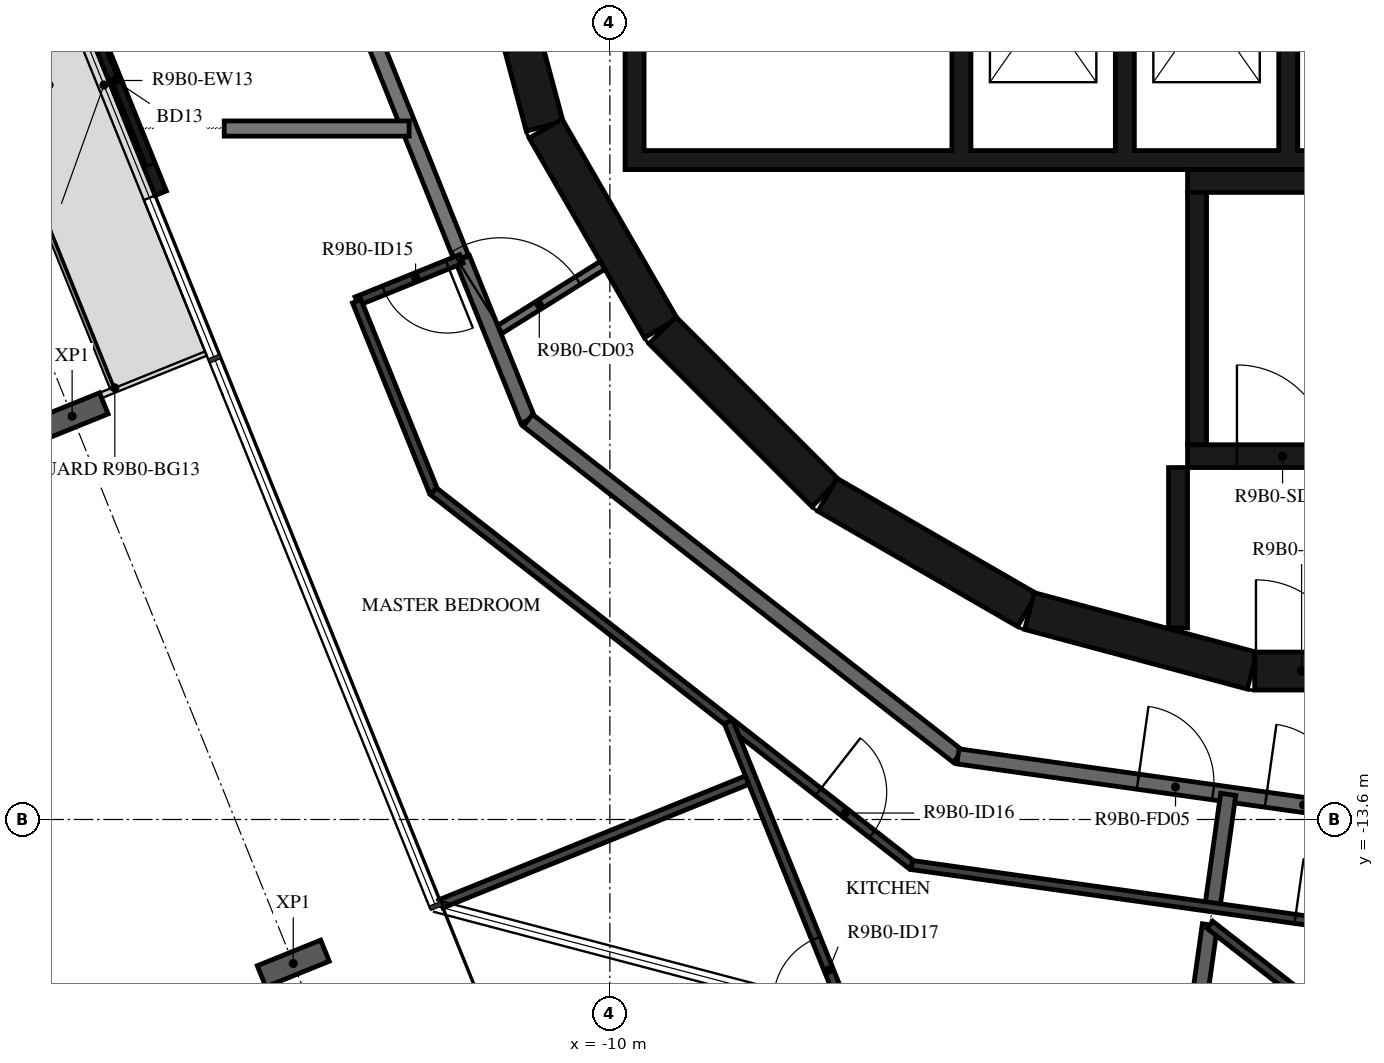
"""IFC4 building model, lengths in metres.
Left out: names, types, materials, properties, quantities, classifications, styles, units other than length and angle.
Written with IfcOpenShell. Run it as: python <this file> out.ifc"""

import sys

from ifc_helpers import new_model, si_unit, direction, frame, frame_2d, origin, origin_2d, place, context, subcontext, project, spatial, polyline, rectangle, i_section, outline, extrude, element, fill, save


model = new_model("IFC4")
c1 = context("Model", 3, precision=1e-05, world=origin(), true_north=direction((0.0, 1.0)))
c2 = subcontext(c1, "Body", "Model", "MODEL_VIEW")
j1 = project(units=[si_unit("LENGTHUNIT", "METRE"), si_unit("PLANEANGLEUNIT", "RADIAN")], contexts=[c1])
p1 = place(None, origin())
s1 = spatial("IfcSite", under=j1, at=p1, CompositionType="ELEMENT")
p2 = place(p1, origin())
s2 = spatial("IfcBuilding", under=s1, at=p2, CompositionType="ELEMENT")
p3 = place(p2, frame((0.0, 0.0, 347.0)))
s3 = spatial("IfcBuildingStorey", under=s2, at=p3, CompositionType="ELEMENT", Elevation=347.0)
for number, where, z_axis, x_axis in (
    (1, (-17.075, -8.294, -0.38), (0.0, 0.0, 1.0), (-0.375, 0.927, 0.0)),
    (2, (-14.166, -15.495, -0.38), (0.0, 0.0, 1.0), (-0.375, 0.927, 0.0)),
):
    element("IfcColumn", number, at=place(p3, frame(where, z_axis=z_axis, x_axis=x_axis)), inside=s3, PredefinedType="COLUMN", context=c2, shape_type="SweptSolid", body=[
        extrude(i_section(OverallWidth=0.3, OverallDepth=0.9, WebThickness=0.019, FlangeThickness=0.035, FilletRadius=0.03, at=origin_2d()), origin(), (0.0, 0.0, 1.0), 3.5),
    ])
p4 = place(p3, frame((-17.107, -2.394, 0.0), z_axis=(0.0, 0.0, 1.0), x_axis=(0.374598019739, -0.927187318511, 0.0)))
e3 = element("IfcWall", 3, at=p4, inside=s3, PredefinedType="STANDARD", context=c2, shape_type="SweptSolid", body=[
    extrude(rectangle(XDim=3.2, YDim=0.16, at=frame_2d((1.6, 0.0))), origin(), (0.0, 0.0, 1.0), 3.12),
])
p5 = place(p4, frame((0.4, 0.0, 0.0)))
e4 = element("IfcOpeningElement", 4, at=p5, cuts=e3, PredefinedType="OPENING", context=c2, shape_type="SweptSolid", body=[
    extrude(rectangle(XDim=2.4, YDim=2.4, at=frame_2d((1.2, 1.2))), frame((0.0, 0.09, 0.0), z_axis=(0.0, -1.0, 0.0), x_axis=(1.0, 0.0, 0.0)), (0.0, 0.0, 1.0), 0.18),
])
p6 = place(p3, frame((-11.643, -1.55, 0.0), z_axis=(0.0, 0.0, 1.0), x_axis=(0.258734743916, -0.965948410781, 0.0)))
e5 = element("IfcWall", 5, at=p6, inside=s3, PredefinedType="SHEAR", context=c2, shape_type="SweptSolid", body=[
    extrude(rectangle(XDim=3.033, YDim=0.5, at=frame_2d((1.516, 0.0))), origin(), (0.0, 0.0, 1.0), 3.12),
])
p7 = place(p6, frame((1.066, 0.0, 0.0)))
e6 = element("IfcOpeningElement", 6, at=p7, cuts=e5, PredefinedType="OPENING", context=c2, shape_type="SweptSolid", body=[
    extrude(rectangle(XDim=0.9, YDim=2.1, at=frame_2d((0.45, 1.05))), frame((0.0, 0.26, 0.0), z_axis=(0.0, -1.0, 0.0), x_axis=(1.0, 0.0, 0.0)), (0.0, 0.0, 1.0), 0.52),
])
p8 = place(p3, frame((-10.845, -4.51, 0.0), z_axis=(0.0, 0.0, 1.0), x_axis=(0.500087131594, -0.865975092491, 0.0)))
e7 = element("IfcWall", 7, at=p8, inside=s3, PredefinedType="SHEAR", context=c2, shape_type="SweptSolid", body=[
    extrude(rectangle(XDim=3.033, YDim=0.5, at=frame_2d((1.516, 0.0))), origin(), (0.0, 0.0, 1.0), 3.12),
])
p9 = place(p3, frame((-9.308, -7.164, 0.0), z_axis=(0.0, 0.0, 1.0), x_axis=(0.707106781187, -0.707106781187, 0.0)))
e8 = element("IfcWall", 8, at=p9, inside=s3, PredefinedType="SHEAR", context=c2, shape_type="SweptSolid", body=[
    extrude(rectangle(XDim=3.032, YDim=0.5, at=frame_2d((1.516, 0.0))), origin(), (0.0, 0.0, 1.0), 3.12),
])
for number, where, z_axis, x_axis in (
    (9, (-7.137, -9.329, 0.0), (0.0, 0.0, 1.0), (0.866, -0.5, 0.0)),
    (10, (-4.479, -10.858, 0.0), (0.0, 0.0, 1.0), (0.966, -0.259, 0.0)),
):
    element("IfcWall", number, at=place(p3, frame(where, z_axis=z_axis, x_axis=x_axis)), inside=s3, PredefinedType="SHEAR", context=c2, shape_type="SweptSolid", body=[
        extrude(rectangle(XDim=3.033, YDim=0.5, at=frame_2d((1.516, 0.0))), origin(), (0.0, 0.0, 1.0), 3.12),
    ])
p10 = place(p3, frame((-1.516, -11.647, 0.0), z_axis=(0.0, 0.0, 1.0), x_axis=(1.0, 0.0, 0.0)))
e11 = element("IfcWall", 11, at=p10, inside=s3, PredefinedType="SHEAR", context=c2, shape_type="SweptSolid", body=[
    extrude(rectangle(XDim=3.033, YDim=0.5, at=frame_2d((1.516, 0.0))), origin(), (0.0, 0.0, 1.0), 3.12),
])
p11 = place(p10, frame((0.016, 0.0, 0.0)))
e12 = element("IfcOpeningElement", 12, at=p11, cuts=e11, PredefinedType="OPENING", context=c2, shape_type="SweptSolid", body=[
    extrude(rectangle(XDim=1.2, YDim=2.1, at=frame_2d((0.6, 1.05))), frame((0.0, 0.26, 0.0), z_axis=(0.0, -1.0, 0.0), x_axis=(1.0, 0.0, 0.0)), (0.0, 0.0, 1.0), 0.52),
])
p12 = place(p3, frame((-2.275, -8.67, 0.0), z_axis=(0.0, 0.0, 1.0), x_axis=(0.0, 1.0, 0.0)))
e13 = element("IfcWall", 13, at=p12, inside=s3, PredefinedType="SHEAR", context=c2, shape_type="SweptSolid", body=[
    extrude(rectangle(XDim=3.32, YDim=0.25, at=frame_2d((1.66, 0.0))), origin(), (0.0, 0.0, 1.0), 3.12),
])
p13 = place(p3, frame((-2.4, -5.2, 0.0), z_axis=(0.0, 0.0, 1.0), x_axis=(1.0, 0.0, 0.0)))
e14 = element("IfcWall", 14, at=p13, inside=s3, PredefinedType="SHEAR", context=c2, shape_type="SweptSolid", body=[
    extrude(rectangle(XDim=7.05, YDim=0.3, at=frame_2d((3.525, 0.0))), origin(), (0.0, 0.0, 1.0), 3.12),
])
p14 = place(p3, frame((-2.4, -8.82, 0.0), z_axis=(0.0, 0.0, 1.0), x_axis=(1.0, 0.0, 0.0)))
e15 = element("IfcWall", 15, at=p14, inside=s3, PredefinedType="SHEAR", context=c2, shape_type="SweptSolid", body=[
    extrude(rectangle(XDim=2.5, YDim=0.3, at=frame_2d((1.25, 0.0))), origin(), (0.0, 0.0, 1.0), 3.12),
])
p15 = place(p14, frame((0.65, 0.0, 0.0)))
e16 = element("IfcOpeningElement", 16, at=p15, cuts=e15, PredefinedType="OPENING", context=c2, shape_type="SweptSolid", body=[
    extrude(rectangle(XDim=1.2, YDim=2.1, at=frame_2d((0.6, 1.05))), frame((0.0, 0.16, 0.0), z_axis=(0.0, -1.0, 0.0), x_axis=(1.0, 0.0, 0.0)), (0.0, 0.0, 1.0), 0.32),
])
p16 = place(p3, frame((-2.525, -8.97, 0.0), z_axis=(0.0, 0.0, 1.0), x_axis=(0.0, -1.0, 0.0)))
e17 = element("IfcWall", 17, at=p16, inside=s3, PredefinedType="SHEAR", context=c2, shape_type="SweptSolid", body=[
    extrude(rectangle(XDim=2.11, YDim=0.25, at=frame_2d((1.055, 0.0))), origin(), (0.0, 0.0, 1.0), 3.12),
])
p17 = place(p3, origin())
e18 = element("IfcWall", 18, at=p17, inside=s3, PredefinedType="SHEAR", context=c2, shape_type="SweptSolid", body=[
    extrude(outline(polyline([(9.8, -5.05), (9.8, -4.8), (9.8, -1.9), (9.55, -1.9), (9.55, -4.8), (7.65, -4.8), (7.65, -1.9), (7.4, -1.9), (7.4, -4.8), (5.5, -4.8), (5.5, -1.9), (5.25, -1.9), (5.25, -4.8), (3.35, -4.8), (3.35, -1.9), (3.1, -1.9), (3.1, -4.8), (1.2, -4.8), (1.2, -1.9), (0.95, -1.9), (0.95, -4.8), (-0.95, -4.8), (-0.95, -1.9), (-1.2, -1.9), (-1.2, -4.8), (-3.1, -4.8), (-3.1, -1.9), (-3.35, -1.9), (-3.35, -4.8), (-5.25, -4.8), (-5.25, -1.9), (-5.5, -1.9), (-5.5, -4.8), (-9.55, -4.8), (-9.55, -1.9), (-9.8, -1.9), (-9.8, -4.8), (-9.8, -5.05), (9.8, -5.05)])), origin(), (0.0, 0.0, 1.0), 3.12),
])
p18 = place(p3, frame((-11.539, -7.21, 0.0), z_axis=(0.0, 0.0, 1.0), x_axis=(0.848103039868, 0.529831325769, 0.0)))
e19 = element("IfcWall", 19, at=p18, inside=s3, PredefinedType="PARTITIONING", context=c2, shape_type="SweptSolid", body=[
    extrude(rectangle(XDim=1.702, YDim=0.12, at=frame_2d((0.851, 0.0))), origin(), (0.0, 0.0, 1.0), 3.12),
])
p19 = place(p18, frame((0.12, 0.0, 0.0)))
e20 = element("IfcOpeningElement", 20, at=p19, cuts=e19, PredefinedType="OPENING", context=c2, shape_type="SweptSolid", body=[
    extrude(rectangle(XDim=1.2, YDim=2.1, at=frame_2d((0.6, 1.05))), frame((0.0, 0.07, 0.0), z_axis=(0.0, -1.0, 0.0), x_axis=(1.0, 0.0, 0.0)), (0.0, 0.0, 1.0), 0.14),
])
p20 = place(p3, frame((-13.769, -1.691, 0.0), z_axis=(0.0, 0.0, 1.0), x_axis=(0.372720094028, -0.927943819155, 0.0)))
e21 = element("IfcWall", 21, at=p20, inside=s3, PredefinedType="STANDARD", context=c2, shape_type="SweptSolid", body=[
    extrude(rectangle(XDim=4.875, YDim=0.2, at=frame_2d((2.438, 0.0))), origin(), (0.0, 0.0, 1.0), 3.12),
])
p21 = place(p3, frame((-11.939, -6.22, 0.0), z_axis=(0.0, 0.0, 1.0), x_axis=(0.374651128394, -0.927165860024, 0.0)))
e22 = element("IfcWall", 22, at=p21, inside=s3, PredefinedType="STANDARD", context=c2, shape_type="SweptSolid", body=[
    extrude(rectangle(XDim=2.296, YDim=0.2, at=frame_2d((1.148, 0.0))), origin(), (0.0, 0.0, 1.0), 3.12),
])
p22 = place(p3, frame((-11.079, -8.349, 0.0), z_axis=(0.0, 0.0, 1.0), x_axis=(0.78800478687, -0.615669112324, 0.0)))
e23 = element("IfcWall", 23, at=p22, inside=s3, PredefinedType="STANDARD", context=c2, shape_type="SweptSolid", body=[
    extrude(rectangle(XDim=7.181, YDim=0.2, at=frame_2d((3.591, 0.0))), origin(), (0.0, 0.0, 1.0), 3.12),
])
p23 = place(p3, frame((-5.42, -12.77, 0.0), z_axis=(0.0, 0.0, 1.0), x_axis=(0.990270565508, -0.139155334385, 0.0)))
e24 = element("IfcWall", 24, at=p23, inside=s3, PredefinedType="STANDARD", context=c2, shape_type="SweptSolid", body=[
    extrude(rectangle(XDim=7.181, YDim=0.2, at=frame_2d((3.59, 0.0))), origin(), (0.0, 0.0, 1.0), 3.12),
])
p24 = place(p23, frame((2.39, 0.0, 0.0)))
e25 = element("IfcOpeningElement", 25, at=p24, cuts=e24, PredefinedType="OPENING", context=c2, shape_type="SweptSolid", body=[
    extrude(rectangle(XDim=1.0, YDim=2.1, at=frame_2d((0.5, 1.05))), frame((0.0, 0.11, 0.0), z_axis=(0.0, -1.0, 0.0), x_axis=(1.0, 0.0, 0.0)), (0.0, 0.0, 1.0), 0.22),
])
p25 = place(p23, frame((4.091, 0.0, 0.0)))
e26 = element("IfcOpeningElement", 26, at=p25, cuts=e24, PredefinedType="OPENING", context=c2, shape_type="SweptSolid", body=[
    extrude(rectangle(XDim=1.0, YDim=2.1, at=frame_2d((0.5, 1.05))), frame((0.0, 0.11, 0.0), z_axis=(0.0, -1.0, 0.0), x_axis=(1.0, 0.0, 0.0)), (0.0, 0.0, 1.0), 0.22),
])
p26 = place(p3, frame((-15.074, -4.51, 0.0), z_axis=(0.0, 0.0, 1.0), x_axis=(1.0, 0.0, 0.0)))
e27 = element("IfcWall", 27, at=p26, inside=s3, PredefinedType="STANDARD", context=c2, shape_type="SweptSolid", body=[
    extrude(rectangle(XDim=2.433, YDim=0.2, at=frame_2d((1.216, 0.0))), origin(), (0.0, 0.0, 1.0), 3.12),
])
p27 = place(p3, frame((-2.073, -14.755, 0.0), z_axis=(0.0, 0.0, 1.0), x_axis=(0.139005431033, 0.990291618738, 0.0)))
e28 = element("IfcWall", 28, at=p27, inside=s3, PredefinedType="STANDARD", context=c2, shape_type="SweptSolid", body=[
    extrude(rectangle(XDim=1.5, YDim=0.2, at=frame_2d((0.75, 0.0))), origin(), (0.0, 0.0, 1.0), 3.12),
])
p28 = place(p3, frame((-2.256, -16.055, 0.0), z_axis=(0.0, 0.0, 1.0), x_axis=(0.139109268657, 0.990277037689, 0.0)))
e29 = element("IfcWall", 29, at=p28, inside=s3, PredefinedType="STANDARD", context=c2, shape_type="SweptSolid", body=[
    extrude(rectangle(XDim=1.079, YDim=0.2, at=frame_2d((0.54, 0.0))), origin(), (0.0, 0.0, 1.0), 3.12),
])
p29 = place(p3, frame((-11.953, -6.225, 0.0), z_axis=(0.0, 0.0, 1.0), x_axis=(-0.927144096717, -0.374704982518, 0.0)))
e30 = element("IfcWall", 30, at=p29, inside=s3, PredefinedType="PARTITIONING", context=c2, shape_type="SweptSolid", body=[
    extrude(rectangle(XDim=1.485, YDim=0.12, at=frame_2d((0.742, 0.0))), origin(), (0.0, 0.0, 1.0), 3.12),
])
p30 = place(p29, frame((0.2, 0.0, 0.0)))
e31 = element("IfcOpeningElement", 31, at=p30, cuts=e30, PredefinedType="OPENING", context=c2, shape_type="SweptSolid", body=[
    extrude(rectangle(XDim=0.9, YDim=2.1, at=frame_2d((0.45, 1.05))), frame((0.0, 0.07, 0.0), z_axis=(0.0, -1.0, 0.0), x_axis=(1.0, 0.0, 0.0)), (0.0, 0.0, 1.0), 0.14),
])
p31 = place(p3, frame((-13.33, -6.782, 0.0), z_axis=(0.0, 0.0, 1.0), x_axis=(0.374602180132, -0.927185637637, 0.0)))
e32 = element("IfcWall", 32, at=p31, inside=s3, PredefinedType="PARTITIONING", context=c2, shape_type="SweptSolid", body=[
    extrude(rectangle(XDim=2.698, YDim=0.12, at=frame_2d((1.349, 0.0))), origin(), (0.0, 0.0, 1.0), 3.12),
])
p32 = place(p3, frame((-12.319, -9.283, 0.0), z_axis=(0.0, 0.0, 1.0), x_axis=(0.788000268464, -0.61567489546, 0.0)))
e33 = element("IfcWall", 33, at=p32, inside=s3, PredefinedType="PARTITIONING", context=c2, shape_type="SweptSolid", body=[
    extrude(rectangle(XDim=7.985, YDim=0.12, at=frame_2d((3.992, 0.0))), origin(), (0.0, 0.0, 1.0), 3.12),
])
p33 = place(p32, frame((6.423, 0.0, 0.0)))
e34 = element("IfcOpeningElement", 34, at=p33, cuts=e33, PredefinedType="OPENING", context=c2, shape_type="SweptSolid", body=[
    extrude(rectangle(XDim=0.9, YDim=2.1, at=frame_2d((0.45, 1.05))), frame((0.0, 0.07, 0.0), z_axis=(0.0, -1.0, 0.0), x_axis=(1.0, 0.0, 0.0)), (0.0, 0.0, 1.0), 0.14),
])
p34 = place(p3, frame((-6.027, -14.199, 0.0), z_axis=(0.0, 0.0, 1.0), x_axis=(0.990271617837, -0.139147845494, 0.0)))
e35 = element("IfcWall", 35, at=p34, inside=s3, PredefinedType="PARTITIONING", context=c2, shape_type="SweptSolid", body=[
    extrude(rectangle(XDim=7.308, YDim=0.12, at=frame_2d((3.654, 0.0))), origin(), (0.0, 0.0, 1.0), 3.12),
])
p35 = place(p34, frame((5.093, 0.0, 0.0)))
e36 = element("IfcOpeningElement", 36, at=p35, cuts=e35, PredefinedType="OPENING", context=c2, shape_type="SweptSolid", body=[
    extrude(rectangle(XDim=0.8, YDim=2.1, at=frame_2d((0.4, 1.05))), frame((0.0, 0.07, 0.0), z_axis=(0.0, -1.0, 0.0), x_axis=(1.0, 0.0, 0.0)), (0.0, 0.0, 1.0), 0.14),
])
p36 = place(p3, frame((-12.219, -14.708, 0.0), z_axis=(0.0, 0.0, 1.0), x_axis=(0.927189216671, 0.374593321469, 0.0)))
e37 = element("IfcWall", 37, at=p36, inside=s3, PredefinedType="PARTITIONING", context=c2, shape_type="SweptSolid", body=[
    extrude(rectangle(XDim=4.4, YDim=0.12, at=frame_2d((2.2, 0.0))), origin(), (0.0, 0.0, 1.0), 2.73),
])
p37 = place(p3, frame((-5.894, -18.616, 0.0), z_axis=(0.0, 0.0, 1.0), x_axis=(-0.374596683143, 0.927187858515, 0.0)))
e38 = element("IfcWall", 38, at=p37, inside=s3, PredefinedType="PARTITIONING", context=c2, shape_type="SweptSolid", body=[
    extrude(rectangle(XDim=6.796, YDim=0.12, at=frame_2d((3.398, 0.0))), origin(), (0.0, 0.0, 1.0), 3.12),
])
p38 = place(p37, frame((2.822, 0.0, 0.0)))
e39 = element("IfcOpeningElement", 39, at=p38, cuts=e38, PredefinedType="OPENING", context=c2, shape_type="SweptSolid", body=[
    extrude(rectangle(XDim=0.9, YDim=2.1, at=frame_2d((0.45, 1.05))), frame((0.0, 0.07, 0.0), z_axis=(0.0, -1.0, 0.0), x_axis=(1.0, 0.0, 0.0)), (0.0, 0.0, 1.0), 0.14),
])
p39 = place(p3, frame((2.363, -18.478, 0.0), z_axis=(0.0, 0.0, 1.0), x_axis=(-0.788010669333, 0.615661583191, 0.0)))
e40 = element("IfcWall", 40, at=p39, inside=s3, PredefinedType="PARTITIONING", context=c2, shape_type="SweptSolid", body=[
    extrude(rectangle(XDim=5.672, YDim=0.12, at=frame_2d((2.836, 0.0))), origin(), (0.0, 0.0, 1.0), 3.12),
])
p40 = place(p5, origin())
e41 = element("IfcDoor", 41, at=p40, inside=s3, OperationType="DOUBLE_DOOR_SLIDING", PredefinedType="DOOR", context=c2, shape_type="SweptSolid", body=[
    extrude(rectangle(XDim=2.4, YDim=2.4, at=frame_2d((1.2, 1.2))), frame((0.0, 0.025, 0.0), z_axis=(0.0, -1.0, 0.0), x_axis=(1.0, 0.0, 0.0)), (0.0, 0.0, 1.0), 0.05),
])
fill(e4, e41)
p41 = place(p15, origin())
e42 = element("IfcDoor", 42, at=p41, inside=s3, OperationType="SINGLE_SWING_LEFT", PredefinedType="DOOR", context=c2, shape_type="SweptSolid", body=[
    extrude(rectangle(XDim=1.2, YDim=2.1, at=frame_2d((0.6, 1.05))), frame((0.0, 0.025, 0.0), z_axis=(0.0, -1.0, 0.0), x_axis=(1.0, 0.0, 0.0)), (0.0, 0.0, 1.0), 0.05),
])
fill(e16, e42)
p42 = place(p11, origin())
e43 = element("IfcDoor", 43, at=p42, inside=s3, OperationType="SINGLE_SWING_RIGHT", PredefinedType="DOOR", context=c2, shape_type="SweptSolid", body=[
    extrude(rectangle(XDim=1.2, YDim=2.1, at=frame_2d((0.6, 1.05))), frame((0.0, 0.025, 0.0), z_axis=(0.0, -1.0, 0.0), x_axis=(1.0, 0.0, 0.0)), (0.0, 0.0, 1.0), 0.05),
])
fill(e12, e43)
p43 = place(p24, origin())
e44 = element("IfcDoor", 44, at=p43, inside=s3, OperationType="SINGLE_SWING_RIGHT", PredefinedType="DOOR", context=c2, shape_type="SweptSolid", body=[
    extrude(rectangle(XDim=1.0, YDim=2.1, at=frame_2d((0.5, 1.05))), frame((0.0, 0.025, 0.0), z_axis=(0.0, -1.0, 0.0), x_axis=(1.0, 0.0, 0.0)), (0.0, 0.0, 1.0), 0.05),
])
fill(e25, e44)
p44 = place(p30, origin())
e45 = element("IfcDoor", 45, at=p44, inside=s3, OperationType="SINGLE_SWING_LEFT", PredefinedType="DOOR", context=c2, shape_type="SweptSolid", body=[
    extrude(rectangle(XDim=0.9, YDim=2.1, at=frame_2d((0.45, 1.05))), frame((0.0, 0.025, 0.0), z_axis=(0.0, -1.0, 0.0), x_axis=(1.0, 0.0, 0.0)), (0.0, 0.0, 1.0), 0.05),
])
fill(e31, e45)
p45 = place(p33, origin())
e46 = element("IfcDoor", 46, at=p45, inside=s3, OperationType="SINGLE_SWING_RIGHT", PredefinedType="DOOR", context=c2, shape_type="SweptSolid", body=[
    extrude(rectangle(XDim=0.9, YDim=2.1, at=frame_2d((0.45, 1.05))), frame((0.0, 0.025, 0.0), z_axis=(0.0, -1.0, 0.0), x_axis=(1.0, 0.0, 0.0)), (0.0, 0.0, 1.0), 0.05),
])
fill(e34, e46)
p46 = place(p38, origin())
e47 = element("IfcDoor", 47, at=p46, inside=s3, OperationType="SINGLE_SWING_RIGHT", PredefinedType="DOOR", context=c2, shape_type="SweptSolid", body=[
    extrude(rectangle(XDim=0.9, YDim=2.1, at=frame_2d((0.45, 1.05))), frame((0.0, 0.025, 0.0), z_axis=(0.0, -1.0, 0.0), x_axis=(1.0, 0.0, 0.0)), (0.0, 0.0, 1.0), 0.05),
])
fill(e39, e47)
p47 = place(p25, origin())
e48 = element("IfcDoor", 48, at=p47, inside=s3, OperationType="SINGLE_SWING_RIGHT", PredefinedType="DOOR", context=c2, shape_type="SweptSolid", body=[
    extrude(rectangle(XDim=1.0, YDim=2.1, at=frame_2d((0.5, 1.05))), frame((0.0, 0.025, 0.0), z_axis=(0.0, -1.0, 0.0), x_axis=(1.0, 0.0, 0.0)), (0.0, 0.0, 1.0), 0.05),
])
fill(e26, e48)
p48 = place(p35, origin())
e49 = element("IfcDoor", 49, at=p48, inside=s3, OperationType="SINGLE_SWING_LEFT", PredefinedType="DOOR", context=c2, shape_type="SweptSolid", body=[
    extrude(rectangle(XDim=0.8, YDim=2.1, at=frame_2d((0.4, 1.05))), frame((0.0, 0.025, 0.0), z_axis=(0.0, -1.0, 0.0), x_axis=(1.0, 0.0, 0.0)), (0.0, 0.0, 1.0), 0.05),
])
fill(e36, e49)
p49 = place(p19, origin())
e50 = element("IfcDoor", 50, at=p49, inside=s3, OperationType="DOUBLE_DOOR_SINGLE_SWING", PredefinedType="DOOR", context=c2, shape_type="SweptSolid", body=[
    extrude(rectangle(XDim=1.2, YDim=2.1, at=frame_2d((0.6, 1.05))), frame((0.0, 0.025, 0.0), z_axis=(0.0, -1.0, 0.0), x_axis=(1.0, 0.0, 0.0)), (0.0, 0.0, 1.0), 0.05),
])
fill(e20, e50)
save(model, sys.argv[1])
